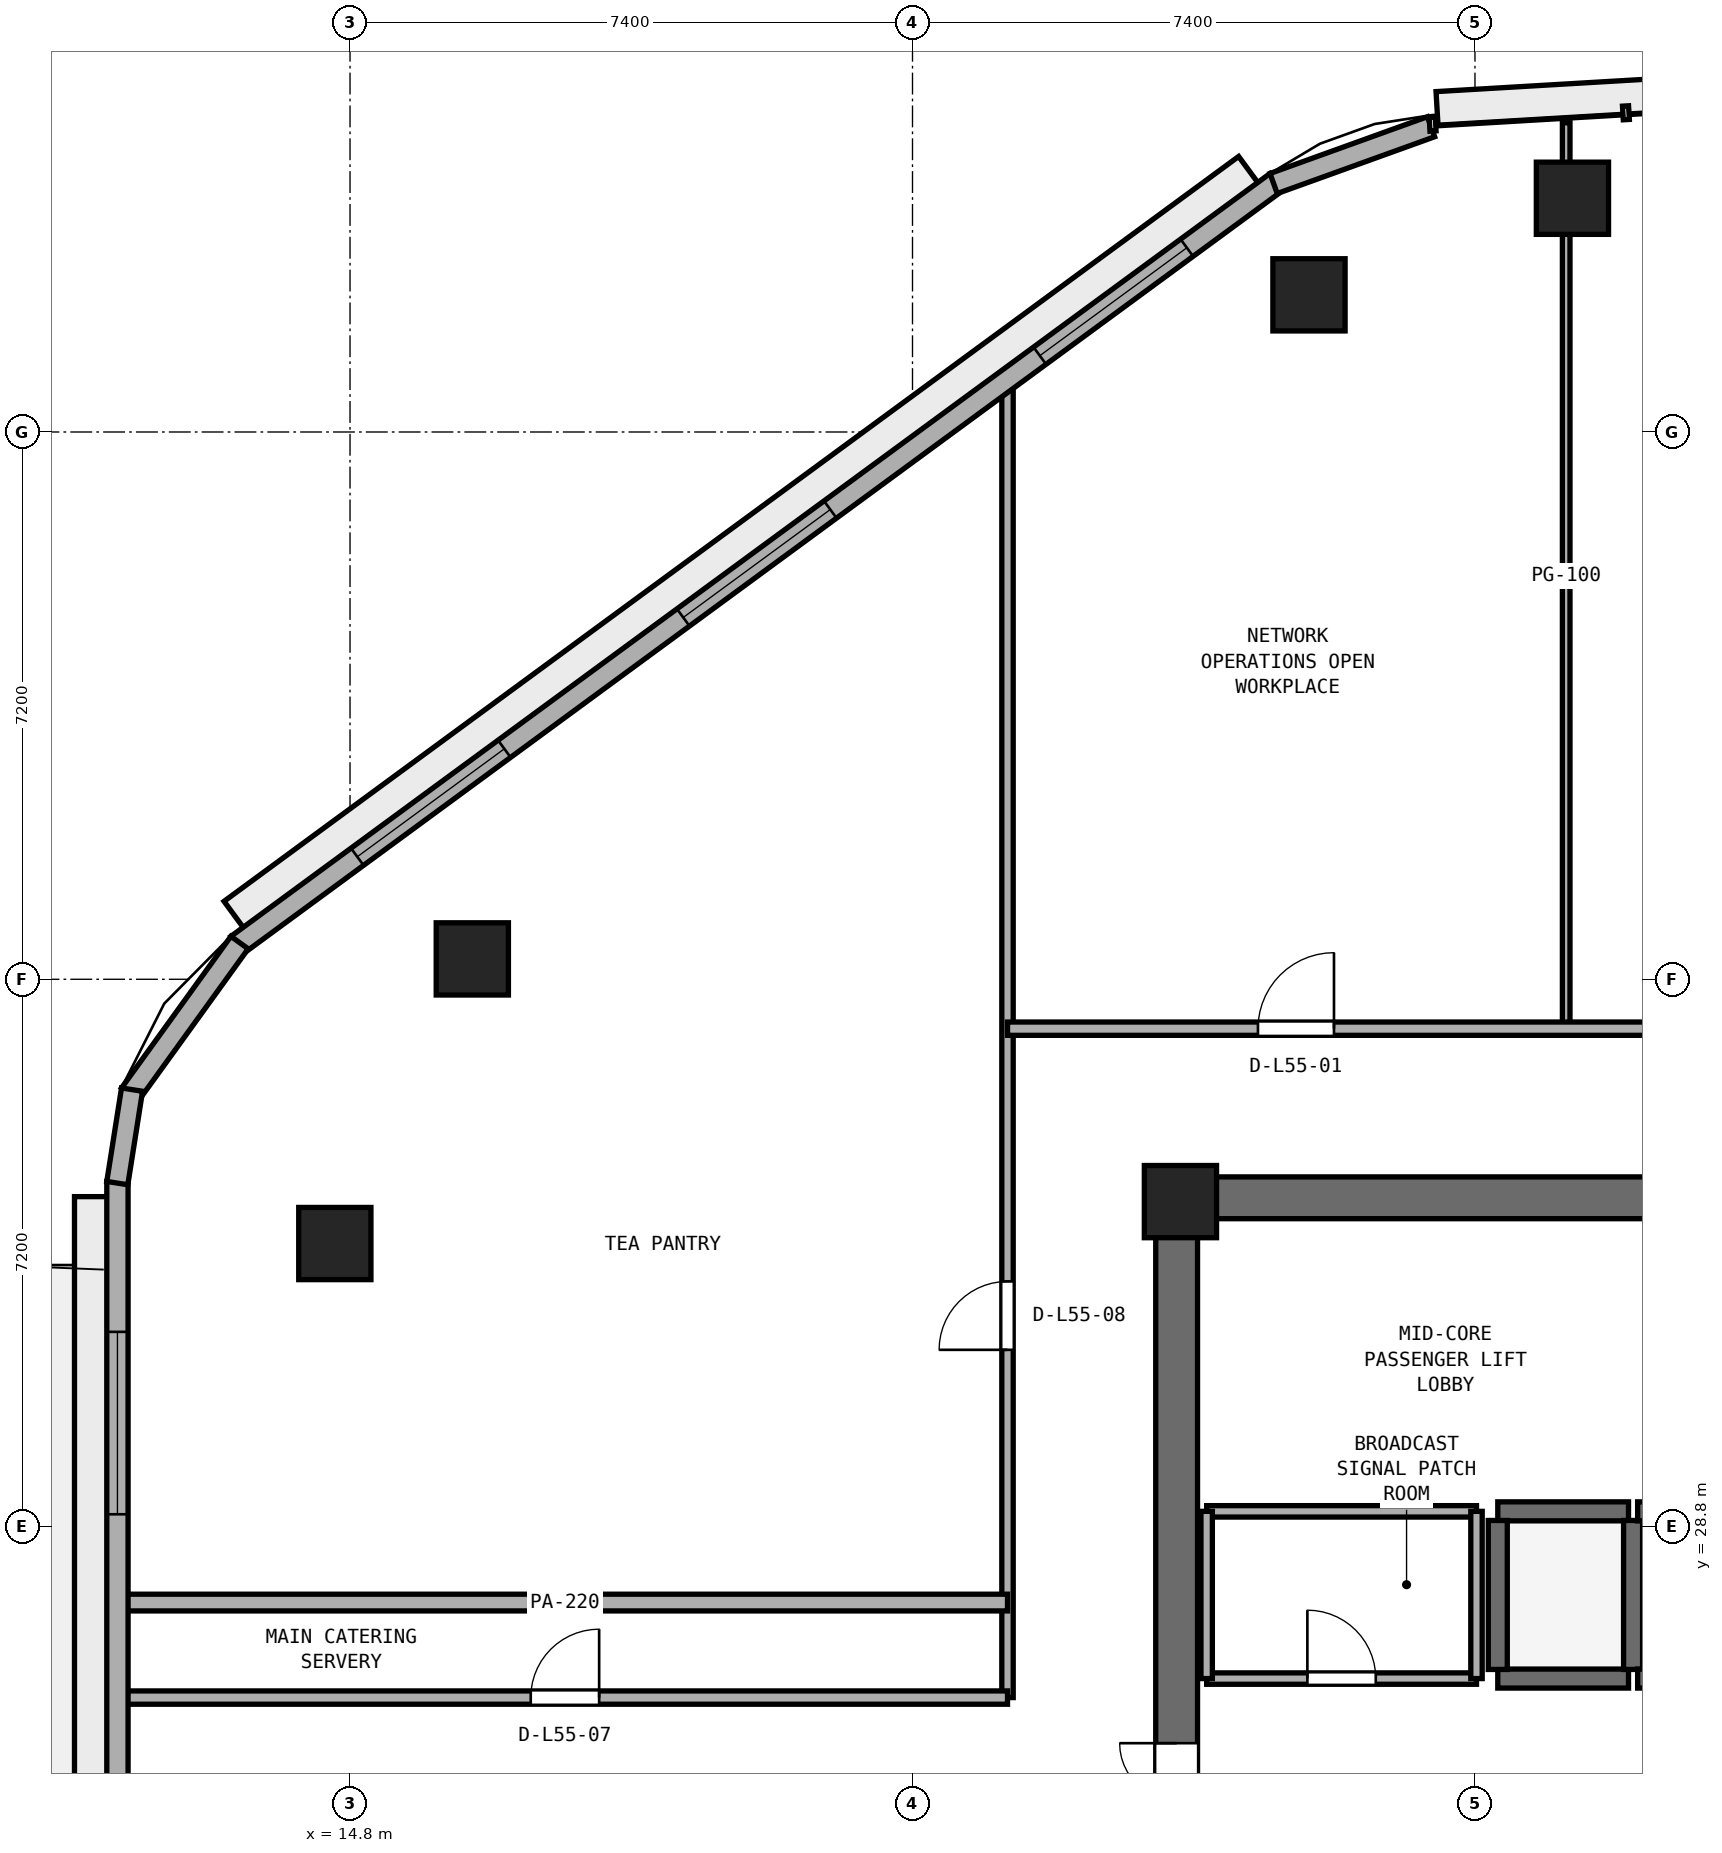
"""IFC4 building model, lengths in metres.
Left out: names, types, materials, properties, quantities, classifications, styles, units other than length and angle.
Written with IfcOpenShell. Run it as: python <this file> out.ifc"""

import sys

from ifc_helpers import new_model, si_unit, direction, frame, frame_2d, origin, origin_2d, place, context, subcontext, project, spatial, rectangle, extrude, element, fill, save


model = new_model("IFC4")
c1 = context("Model", 3, precision=1e-05, world=origin(), true_north=direction((0.0, 1.0)))
c2 = subcontext(c1, "Body", "Model", "MODEL_VIEW")
j1 = project(units=[si_unit("LENGTHUNIT", "METRE"), si_unit("PLANEANGLEUNIT", "RADIAN")], contexts=[c1])
p1 = place(None, origin())
s1 = spatial("IfcSite", under=j1, at=p1, CompositionType="ELEMENT")
p2 = place(p1, origin())
s2 = spatial("IfcBuilding", under=s1, at=p2, CompositionType="ELEMENT")
p3 = place(p2, frame((0.0, 0.0, 216.2)))
s3 = spatial("IfcBuildingStorey", under=s2, at=p3, CompositionType="ELEMENT", Elevation=216.2)
p4 = place(p3, frame((25.4, 33.125, 0.0), z_axis=(0.0, 0.0, 1.0), x_axis=(1.0, 0.0, 0.0)))
e1 = element("IfcWall", 1, at=p4, inside=s3, PredefinedType="SHEAR", context=c2, shape_type="SweptSolid", body=[
    extrude(rectangle(XDim=23.2, YDim=0.55, at=frame_2d((11.6, 0.0))), origin(), (0.0, 0.0, 1.0), 3.4),
])
p5 = place(p3, frame((25.675, 17.55, 0.0), z_axis=(0.0, 0.0, 1.0), x_axis=(0.0, 1.0, 0.0)))
e2 = element("IfcWall", 2, at=p5, inside=s3, PredefinedType="SHEAR", context=c2, shape_type="SweptSolid", body=[
    extrude(rectangle(XDim=15.3, YDim=0.55, at=frame_2d((7.65, 0.0))), origin(), (0.0, 0.0, 1.0), 3.4),
])
p6 = place(p5, frame((6.9, 0.0, 0.0)))
e3 = element("IfcOpeningElement", 3, at=p6, cuts=e2, PredefinedType="OPENING", context=c2, shape_type="SweptSolid", body=[
    extrude(rectangle(XDim=1.5, YDim=2.15, at=frame_2d((0.75, 1.075))), frame((0.0, 0.285, 0.0), z_axis=(0.0, -1.0, 0.0), x_axis=(1.0, 0.0, 0.0)), (0.0, 0.0, 1.0), 0.57),
])
p7 = place(p3, frame((25.725, 33.075, 0.0), z_axis=(0.0, 0.0, 1.0), x_axis=(1.0, 0.0, 0.0)))
e4 = element("IfcColumn", 4, at=p7, inside=s3, PredefinedType="PILASTER", context=c2, shape_type="SweptSolid", body=[
    extrude(rectangle(XDim=0.95, YDim=0.95, at=origin_2d()), origin(), (0.0, 0.0, 1.0), 3.8),
])
for number, where, z_axis, x_axis in (
    (5, (30.882, 46.275, 0.0), (0.0, 0.0, 1.0), (1.0, 0.0, 0.0)),
    (6, (27.416, 45.004, 0.0), (0.0, 0.0, 1.0), (1.0, 0.0, 0.0)),
    (7, (16.409, 36.268, 0.0), (0.0, 0.0, 1.0), (1.0, 0.0, 0.0)),
    (8, (14.6, 32.523, 0.0), (0.0, 0.0, 1.0), (1.0, 0.0, 0.0)),
):
    element("IfcColumn", number, at=place(p3, frame(where, z_axis=z_axis, x_axis=x_axis)), inside=s3, PredefinedType="COLUMN", context=c2, shape_type="SweptSolid", body=[
        extrude(rectangle(XDim=0.95, YDim=0.95, at=origin_2d()), origin(), (0.0, 0.0, 1.0), 3.8),
    ])
for number, where, z_axis, x_axis in (
    (9, (29.9, 26.8, 0.0), (0.0, 0.0, 1.0), (1.0, 0.0, 0.0)),
    (10, (29.9, 29.0, 0.0), (0.0, 0.0, 1.0), (1.0, 0.0, 0.0)),
):
    element("IfcWall", number, at=place(p3, frame(where, z_axis=z_axis, x_axis=x_axis)), inside=s3, PredefinedType="SHEAR", context=c2, shape_type="SweptSolid", body=[
        extrude(rectangle(XDim=1.72, YDim=0.25, at=frame_2d((0.86, 0.0))), origin(), (0.0, 0.0, 1.0), 3.4),
    ])
for number, where, z_axis, x_axis in (
    (11, (29.9, 26.92, 0.0), (0.0, 0.0, 1.0), (0.0, 1.0, 0.0)),
    (12, (31.68, 26.92, 0.0), (0.0, 0.0, 1.0), (0.0, 1.0, 0.0)),
):
    element("IfcWall", number, at=place(p3, frame(where, z_axis=z_axis, x_axis=x_axis)), inside=s3, PredefinedType="SHEAR", context=c2, shape_type="SweptSolid", body=[
        extrude(rectangle(XDim=1.96, YDim=0.25, at=frame_2d((0.98, 0.0))), origin(), (0.0, 0.0, 1.0), 3.4),
    ])
for number, where, z_axis, x_axis in (
    (13, (31.74, 26.8, 0.0), (0.0, 0.0, 1.0), (1.0, 0.0, 0.0)),
    (14, (31.74, 29.0, 0.0), (0.0, 0.0, 1.0), (1.0, 0.0, 0.0)),
):
    element("IfcWall", number, at=place(p3, frame(where, z_axis=z_axis, x_axis=x_axis)), inside=s3, PredefinedType="SHEAR", context=c2, shape_type="SweptSolid", body=[
        extrude(rectangle(XDim=1.72, YDim=0.25, at=frame_2d((0.86, 0.0))), origin(), (0.0, 0.0, 1.0), 3.4),
    ])
p8 = place(p3, frame((26.07, 26.8, 0.0), z_axis=(0.0, 0.0, 1.0), x_axis=(1.0, 0.0, 0.0)))
e15 = element("IfcWall", 15, at=p8, inside=s3, PredefinedType="PARTITIONING", context=c2, shape_type="SweptSolid", body=[
    extrude(rectangle(XDim=3.55, YDim=0.15, at=frame_2d((1.775, 0.0))), origin(), (0.0, 0.0, 1.0), 3.4),
])
p9 = place(p8, frame((1.325, 0.0, 0.0)))
e16 = element("IfcOpeningElement", 16, at=p9, cuts=e15, PredefinedType="OPENING", context=c2, shape_type="SweptSolid", body=[
    extrude(rectangle(XDim=0.9, YDim=2.1, at=frame_2d((0.45, 1.05))), frame((0.0, 0.085, 0.0), z_axis=(0.0, -1.0, 0.0), x_axis=(1.0, 0.0, 0.0)), (0.0, 0.0, 1.0), 0.17),
])
p10 = place(p3, frame((26.07, 29.0, 0.0), z_axis=(0.0, 0.0, 1.0), x_axis=(1.0, 0.0, 0.0)))
e17 = element("IfcWall", 17, at=p10, inside=s3, PredefinedType="PARTITIONING", context=c2, shape_type="SweptSolid", body=[
    extrude(rectangle(XDim=3.55, YDim=0.15, at=frame_2d((1.775, 0.0))), origin(), (0.0, 0.0, 1.0), 3.4),
])
p11 = place(p3, frame((26.07, 26.8, 0.0), z_axis=(0.0, 0.0, 1.0), x_axis=(0.0, 1.0, 0.0)))
e18 = element("IfcWall", 18, at=p11, inside=s3, PredefinedType="PARTITIONING", context=c2, shape_type="SweptSolid", body=[
    extrude(rectangle(XDim=2.2, YDim=0.15, at=frame_2d((1.1, 0.0))), origin(), (0.0, 0.0, 1.0), 2.5),
])
p12 = place(p3, frame((29.62, 26.8, 0.0), z_axis=(0.0, 0.0, 1.0), x_axis=(0.0, 1.0, 0.0)))
e19 = element("IfcWall", 19, at=p12, inside=s3, PredefinedType="PARTITIONING", context=c2, shape_type="SweptSolid", body=[
    extrude(rectangle(XDim=2.2, YDim=0.15, at=frame_2d((1.1, 0.0))), origin(), (0.0, 0.0, 1.0), 3.4),
])
p13 = place(p3, frame((30.8, 35.35, 0.0), z_axis=(0.0, 0.0, 1.0), x_axis=(0.0, 1.0, 0.0)))
e20 = element("IfcWall", 20, at=p13, inside=s3, PredefinedType="PARTITIONING", context=c2, shape_type="SweptSolid", body=[
    extrude(rectangle(XDim=11.918, YDim=0.1, at=frame_2d((5.959, 0.0))), origin(), (0.0, 0.0, 1.0), 2.783),
])
p14 = place(p3, frame((23.45, 26.55, 0.0), z_axis=(0.0, 0.0, 1.0), x_axis=(0.0, 1.0, 0.0)))
e21 = element("IfcWall", 21, at=p14, inside=s3, PredefinedType="PARTITIONING", context=c2, shape_type="SweptSolid", body=[
    extrude(rectangle(XDim=17.375, YDim=0.15, at=frame_2d((8.688, 0.0))), origin(), (0.0, 0.0, 1.0), 3.4),
])
p15 = place(p14, frame((4.575, 0.0, 0.0)))
e22 = element("IfcOpeningElement", 22, at=p15, cuts=e21, PredefinedType="OPENING", context=c2, shape_type="SweptSolid", body=[
    extrude(rectangle(XDim=0.9, YDim=2.1, at=frame_2d((0.45, 1.05))), frame((0.0, 0.085, 0.0), z_axis=(0.0, -1.0, 0.0), x_axis=(1.0, 0.0, 0.0)), (0.0, 0.0, 1.0), 0.17),
])
p16 = place(p3, frame((11.805, 26.55, 0.0), z_axis=(0.0, 0.0, 1.0), x_axis=(1.0, 0.0, 0.0)))
e23 = element("IfcWall", 23, at=p16, inside=s3, PredefinedType="PARTITIONING", context=c2, shape_type="SweptSolid", body=[
    extrude(rectangle(XDim=11.645, YDim=0.175, at=frame_2d((5.823, 0.0))), origin(), (0.0, 0.0, 1.0), 3.4),
])
p17 = place(p16, frame((5.373, 0.0, 0.0)))
e24 = element("IfcOpeningElement", 24, at=p17, cuts=e23, PredefinedType="OPENING", context=c2, shape_type="SweptSolid", body=[
    extrude(rectangle(XDim=0.9, YDim=2.1, at=frame_2d((0.45, 1.05))), frame((0.0, 0.097, 0.0), z_axis=(0.0, -1.0, 0.0), x_axis=(1.0, 0.0, 0.0)), (0.0, 0.0, 1.0), 0.195),
])
p18 = place(p3, frame((11.805, 27.8, 0.0), z_axis=(0.0, 0.0, 1.0), x_axis=(1.0, 0.0, 0.0)))
e25 = element("IfcWall", 25, at=p18, inside=s3, PredefinedType="PARTITIONING", context=c2, shape_type="SweptSolid", body=[
    extrude(rectangle(XDim=11.645, YDim=0.22, at=frame_2d((5.823, 0.0))), origin(), (0.0, 0.0, 1.0), 3.4),
])
p19 = place(p3, frame((23.45, 35.35, 0.0), z_axis=(0.0, 0.0, 1.0), x_axis=(1.0, 0.0, 0.0)))
e26 = element("IfcWall", 26, at=p19, inside=s3, PredefinedType="PARTITIONING", context=c2, shape_type="SweptSolid", body=[
    extrude(rectangle(XDim=10.95, YDim=0.175, at=frame_2d((5.475, 0.0))), origin(), (0.0, 0.0, 1.0), 3.4),
])
p20 = place(p19, frame((3.295, 0.0, 0.0)))
e27 = element("IfcOpeningElement", 27, at=p20, cuts=e26, PredefinedType="OPENING", context=c2, shape_type="SweptSolid", body=[
    extrude(rectangle(XDim=1.0, YDim=2.12, at=frame_2d((0.5, 1.06))), frame((0.0, 0.097, 0.0), z_axis=(0.0, -1.0, 0.0), x_axis=(1.0, 0.0, 0.0)), (0.0, 0.0, 1.0), 0.195),
])
p21 = place(p19, frame((8.53, 0.0, 0.0)))
e28 = element("IfcOpeningElement", 28, at=p21, cuts=e26, PredefinedType="OPENING", context=c2, shape_type="SweptSolid", body=[
    extrude(rectangle(XDim=1.0, YDim=2.12, at=frame_2d((0.5, 1.06))), frame((0.0, 0.097, 0.0), z_axis=(0.0, -1.0, 0.0), x_axis=(1.0, 0.0, 0.0)), (0.0, 0.0, 1.0), 0.195),
])
p22 = place(p3, frame((26.986, 46.488, 0.0), z_axis=(0.0, 0.0, 1.0), x_axis=(-0.806097783211, -0.59178236194, 0.0)))
e29 = element("IfcWall", 29, at=p22, inside=s3, PredefinedType="STANDARD", context=c2, shape_type="SweptSolid", body=[
    extrude(rectangle(XDim=16.959, YDim=0.28, at=frame_2d((8.479, 0.0))), origin(), (0.0, 0.0, 1.0), 3.4),
])
p23 = place(p22, frame((1.46, 0.0, 0.9)))
e30 = element("IfcOpeningElement", 30, at=p23, cuts=e29, PredefinedType="OPENING", context=c2, shape_type="SweptSolid", body=[
    extrude(rectangle(XDim=2.4, YDim=1.75, at=frame_2d((1.2, 0.875))), frame((0.0, 0.15, 0.0), z_axis=(0.0, -1.0, 0.0), x_axis=(1.0, 0.0, 0.0)), (0.0, 0.0, 1.0), 0.3),
])
p24 = place(p22, frame((7.279, 0.0, 0.9)))
e31 = element("IfcOpeningElement", 31, at=p24, cuts=e29, PredefinedType="OPENING", context=c2, shape_type="SweptSolid", body=[
    extrude(rectangle(XDim=2.4, YDim=1.75, at=frame_2d((1.2, 0.875))), frame((0.0, 0.15, 0.0), z_axis=(0.0, -1.0, 0.0), x_axis=(1.0, 0.0, 0.0)), (0.0, 0.0, 1.0), 0.3),
])
p25 = place(p22, frame((12.599, 0.0, 0.9)))
e32 = element("IfcOpeningElement", 32, at=p25, cuts=e29, PredefinedType="OPENING", context=c2, shape_type="SweptSolid", body=[
    extrude(rectangle(XDim=2.4, YDim=1.75, at=frame_2d((1.2, 0.875))), frame((0.0, 0.15, 0.0), z_axis=(0.0, -1.0, 0.0), x_axis=(1.0, 0.0, 0.0)), (0.0, 0.0, 1.0), 0.3),
])
p26 = place(p3, frame((11.74, 33.34, 0.0), z_axis=(0.0, 0.0, 1.0), x_axis=(0.0, -1.0, 0.0)))
e33 = element("IfcWall", 33, at=p26, inside=s3, PredefinedType="STANDARD", context=c2, shape_type="SweptSolid", body=[
    extrude(rectangle(XDim=17.073, YDim=0.28, at=frame_2d((8.536, 0.0))), origin(), (0.0, 0.0, 1.0), 3.4),
])
p27 = place(p26, frame((7.986, 0.0, 0.0)))
e34 = element("IfcOpeningElement", 34, at=p27, cuts=e33, PredefinedType="OPENING", context=c2, shape_type="SweptSolid", body=[
    extrude(rectangle(XDim=1.1, YDim=2.2, at=frame_2d((0.55, 1.1))), frame((0.0, 0.15, 0.0), z_axis=(0.0, -1.0, 0.0), x_axis=(1.0, 0.0, 0.0)), (0.0, 0.0, 1.0), 0.3),
])
p28 = place(p26, frame((1.979, 0.0, 0.9)))
e35 = element("IfcOpeningElement", 35, at=p28, cuts=e33, PredefinedType="OPENING", context=c2, shape_type="SweptSolid", body=[
    extrude(rectangle(XDim=2.4, YDim=1.75, at=frame_2d((1.2, 0.875))), frame((0.0, 0.15, 0.0), z_axis=(0.0, -1.0, 0.0), x_axis=(1.0, 0.0, 0.0)), (0.0, 0.0, 1.0), 0.3),
])
p29 = place(p26, frame((12.694, 0.0, 0.9)))
e36 = element("IfcOpeningElement", 36, at=p29, cuts=e33, PredefinedType="OPENING", context=c2, shape_type="SweptSolid", body=[
    extrude(rectangle(XDim=2.4, YDim=1.75, at=frame_2d((1.2, 0.875))), frame((0.0, 0.15, 0.0), z_axis=(0.0, -1.0, 0.0), x_axis=(1.0, 0.0, 0.0)), (0.0, 0.0, 1.0), 0.3),
])
p30 = place(p3, frame((29.022, 47.216, 0.0), z_axis=(0.0, 0.0, 1.0), x_axis=(-0.940706330201, -0.339222051643, 0.0)))
e37 = element("IfcWall", 37, at=p30, inside=s3, PredefinedType="STANDARD", context=c2, shape_type="SweptSolid", body=[
    extrude(rectangle(XDim=2.202, YDim=0.28, at=frame_2d((1.101, 0.0))), origin(), (0.0, 0.0, 1.0), 3.4),
])
p31 = place(p3, frame((13.346, 36.483, 0.0), z_axis=(0.0, 0.0, 1.0), x_axis=(-0.585128091556, -0.810940883463, 0.0)))
e38 = element("IfcWall", 38, at=p31, inside=s3, PredefinedType="STANDARD", context=c2, shape_type="SweptSolid", body=[
    extrude(rectangle(XDim=2.46, YDim=0.28, at=frame_2d((1.23, 0.0))), origin(), (0.0, 0.0, 1.0), 3.4),
])
p32 = place(p3, frame((11.932, 34.548, 0.0), z_axis=(0.0, 0.0, 1.0), x_axis=(-0.155519443181, -0.987832831401, 0.0)))
e39 = element("IfcWall", 39, at=p32, inside=s3, PredefinedType="STANDARD", context=c2, shape_type="SweptSolid", body=[
    extrude(rectangle(XDim=1.245, YDim=0.28, at=frame_2d((0.623, 0.0))), origin(), (0.0, 0.0, 1.0), 3.4),
])
p33 = place(p6, origin())
e40 = element("IfcDoor", 40, at=p33, inside=s3, OperationType="DOUBLE_DOOR_SINGLE_SWING", PredefinedType="DOOR", context=c2, shape_type="SweptSolid", body=[
    extrude(rectangle(XDim=1.5, YDim=2.15, at=frame_2d((0.75, 1.075))), frame((0.0, 0.025, 0.0), z_axis=(0.0, -1.0, 0.0), x_axis=(1.0, 0.0, 0.0)), (0.0, 0.0, 1.0), 0.05),
])
fill(e3, e40)
p34 = place(p9, origin())
e41 = element("IfcDoor", 41, at=p34, inside=s3, OperationType="SINGLE_SWING_LEFT", PredefinedType="DOOR", context=c2, shape_type="SweptSolid", body=[
    extrude(rectangle(XDim=0.9, YDim=2.1, at=frame_2d((0.45, 1.05))), frame((0.0, 0.025, 0.0), z_axis=(0.0, -1.0, 0.0), x_axis=(1.0, 0.0, 0.0)), (0.0, 0.0, 1.0), 0.05),
])
fill(e16, e41)
p35 = place(p20, origin())
e42 = element("IfcDoor", 42, at=p35, inside=s3, OperationType="SINGLE_SWING_RIGHT", PredefinedType="DOOR", context=c2, shape_type="SweptSolid", body=[
    extrude(rectangle(XDim=1.0, YDim=2.12, at=frame_2d((0.5, 1.06))), frame((0.0, 0.025, 0.0), z_axis=(0.0, -1.0, 0.0), x_axis=(1.0, 0.0, 0.0)), (0.0, 0.0, 1.0), 0.05),
])
fill(e27, e42)
p36 = place(p17, origin())
e43 = element("IfcDoor", 43, at=p36, inside=s3, OperationType="SINGLE_SWING_RIGHT", PredefinedType="DOOR", context=c2, shape_type="SweptSolid", body=[
    extrude(rectangle(XDim=0.9, YDim=2.1, at=frame_2d((0.45, 1.05))), frame((0.0, 0.025, 0.0), z_axis=(0.0, -1.0, 0.0), x_axis=(1.0, 0.0, 0.0)), (0.0, 0.0, 1.0), 0.05),
])
fill(e24, e43)
p37 = place(p15, origin())
e44 = element("IfcDoor", 44, at=p37, inside=s3, OperationType="SINGLE_SWING_LEFT", PredefinedType="DOOR", context=c2, shape_type="SweptSolid", body=[
    extrude(rectangle(XDim=0.9, YDim=2.1, at=frame_2d((0.45, 1.05))), frame((0.0, 0.025, 0.0), z_axis=(0.0, -1.0, 0.0), x_axis=(1.0, 0.0, 0.0)), (0.0, 0.0, 1.0), 0.05),
])
fill(e22, e44)
p38 = place(p23, origin())
e45 = element("IfcWindow", 45, at=p38, inside=s3, PartitioningType="SINGLE_PANEL", PredefinedType="WINDOW", context=c2, shape_type="SweptSolid", body=[
    extrude(rectangle(XDim=2.4, YDim=1.75, at=frame_2d((1.2, 0.875))), frame((0.0, 0.03, 0.0), z_axis=(0.0, -1.0, 0.0), x_axis=(1.0, 0.0, 0.0)), (0.0, 0.0, 1.0), 0.06),
])
fill(e30, e45)
p39 = place(p24, origin())
e46 = element("IfcWindow", 46, at=p39, inside=s3, PartitioningType="SINGLE_PANEL", PredefinedType="WINDOW", context=c2, shape_type="SweptSolid", body=[
    extrude(rectangle(XDim=2.4, YDim=1.75, at=frame_2d((1.2, 0.875))), frame((0.0, 0.03, 0.0), z_axis=(0.0, -1.0, 0.0), x_axis=(1.0, 0.0, 0.0)), (0.0, 0.0, 1.0), 0.06),
])
fill(e31, e46)
p40 = place(p25, origin())
e47 = element("IfcWindow", 47, at=p40, inside=s3, PartitioningType="SINGLE_PANEL", PredefinedType="WINDOW", context=c2, shape_type="SweptSolid", body=[
    extrude(rectangle(XDim=2.4, YDim=1.75, at=frame_2d((1.2, 0.875))), frame((0.0, 0.03, 0.0), z_axis=(0.0, -1.0, 0.0), x_axis=(1.0, 0.0, 0.0)), (0.0, 0.0, 1.0), 0.06),
])
fill(e32, e47)
p41 = place(p28, origin())
e48 = element("IfcWindow", 48, at=p41, inside=s3, PartitioningType="SINGLE_PANEL", PredefinedType="WINDOW", context=c2, shape_type="SweptSolid", body=[
    extrude(rectangle(XDim=2.4, YDim=1.75, at=frame_2d((1.2, 0.875))), frame((0.0, 0.03, 0.0), z_axis=(0.0, -1.0, 0.0), x_axis=(1.0, 0.0, 0.0)), (0.0, 0.0, 1.0), 0.06),
])
fill(e35, e48)
save(model, sys.argv[1])
